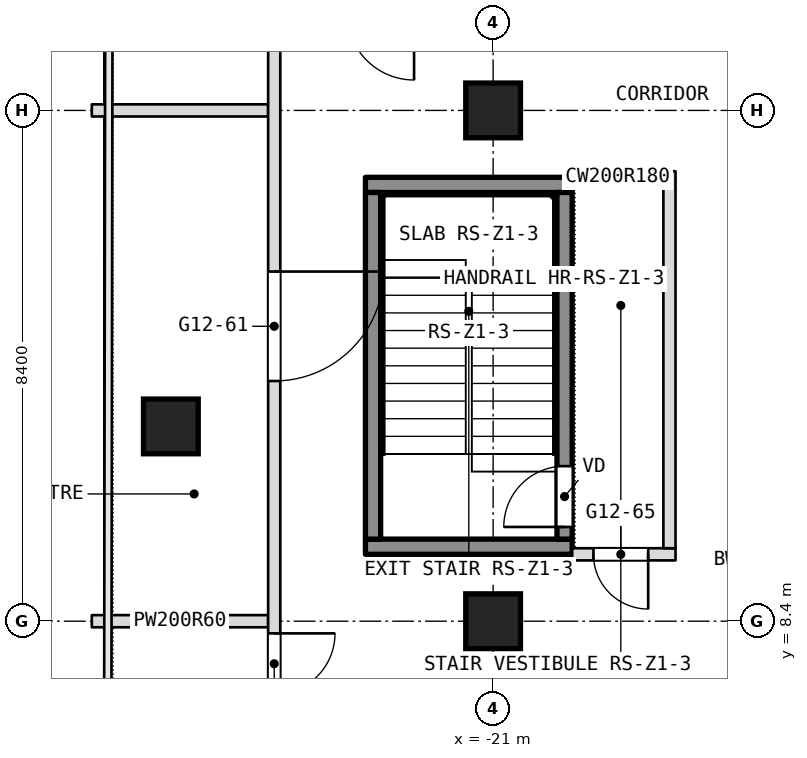
"""IFC4 building model, lengths in metres.
Left out: names, types, materials, properties, quantities, classifications, styles, units other than length and angle.
Written with IfcOpenShell. Run it as: python <this file> out.ifc"""

import sys

from ifc_helpers import new_model, si_unit, direction, frame, frame_2d, origin, origin_2d, place, context, subcontext, project, spatial, rectangle, extrude, element, fill, save


model = new_model("IFC4")
c1 = context("Model", 3, precision=1e-05, world=origin(), true_north=direction((0.0, 1.0)))
c2 = subcontext(c1, "Body", "Model", "MODEL_VIEW")
j1 = project(units=[si_unit("LENGTHUNIT", "METRE"), si_unit("PLANEANGLEUNIT", "RADIAN")], contexts=[c1])
p1 = place(None, origin())
s1 = spatial("IfcSite", under=j1, at=p1, CompositionType="ELEMENT")
p2 = place(p1, origin())
s2 = spatial("IfcBuilding", under=s1, at=p2, CompositionType="ELEMENT")
p3 = place(p2, frame((0.0, 0.0, 140.9)))
s3 = spatial("IfcBuildingStorey", under=s2, at=p3, CompositionType="ELEMENT", Elevation=140.9)
for number, where, z_axis, x_axis in (
    (1, (-21.0, 8.4, 0.0), (0.0, 0.0, 1.0), (1.0, 0.0, 0.0)),
    (2, (-21.0, 16.8, 0.0), (0.0, 0.0, 1.0), (1.0, 0.0, 0.0)),
    (3, (-26.3, 11.603, 0.0), (0.0, 0.0, 1.0), (1.0, 0.0, 0.0)),
):
    element("IfcColumn", number, at=place(p3, frame(where, z_axis=z_axis, x_axis=x_axis)), inside=s3, PredefinedType="COLUMN", context=c2, shape_type="SweptSolid", body=[
        extrude(rectangle(XDim=0.9, YDim=0.9, at=origin_2d()), origin(), (0.0, 0.0, 1.0), 3.6),
    ])
p4 = place(p3, frame((-27.6, 8.4, 0.0), z_axis=(0.0, 0.0, 1.0), x_axis=(1.0, 0.0, 0.0)))
e4 = element("IfcWall", 4, at=p4, inside=s3, PredefinedType="PARTITIONING", context=c2, shape_type="SweptSolid", body=[
    extrude(rectangle(XDim=2.9, YDim=0.2, at=frame_2d((1.45, 0.0))), origin(), (0.0, 0.0, 1.0), 2.89),
])
p5 = place(p3, frame((-19.7, 9.5, 0.0), z_axis=(0.0, 0.0, 1.0), x_axis=(1.0, 0.0, 0.0)))
e5 = element("IfcWall", 5, at=p5, inside=s3, PredefinedType="PARTITIONING", context=c2, shape_type="SweptSolid", body=[
    extrude(rectangle(XDim=1.7, YDim=0.2, at=frame_2d((0.85, 0.0))), origin(), (0.0, 0.0, 1.0), 3.34),
])
p6 = place(p5, frame((0.35, 0.0, 0.0)))
e6 = element("IfcOpeningElement", 6, at=p6, cuts=e5, PredefinedType="OPENING", context=c2, shape_type="SweptSolid", body=[
    extrude(rectangle(XDim=0.9, YDim=2.1, at=frame_2d((0.45, 1.05))), frame((0.0, 0.1, 0.0), z_axis=(0.0, -1.0, 0.0), x_axis=(1.0, 0.0, 0.0)), (0.0, 0.0, 1.0), 0.2),
])
p7 = place(p3, frame((-19.7, 15.7, 0.0), z_axis=(0.0, 0.0, 1.0), x_axis=(1.0, 0.0, 0.0)))
e7 = element("IfcWall", 7, at=p7, inside=s3, PredefinedType="PARTITIONING", context=c2, shape_type="SweptSolid", body=[
    extrude(rectangle(XDim=1.5, YDim=0.2, at=frame_2d((0.75, 0.0))), origin(), (0.0, 0.0, 1.0), 3.34),
])
p8 = place(p3, frame((-27.6, 16.8, 0.0), z_axis=(0.0, 0.0, 1.0), x_axis=(1.0, 0.0, 0.0)))
e8 = element("IfcWall", 8, at=p8, inside=s3, PredefinedType="PARTITIONING", context=c2, shape_type="SweptSolid", body=[
    extrude(rectangle(XDim=2.9, YDim=0.2, at=frame_2d((1.45, 0.0))), origin(), (0.0, 0.0, 1.0), 2.89),
])
p9 = place(p3, frame((-18.1, 9.6, 0.0), z_axis=(0.0, 0.0, 1.0), x_axis=(0.0, 1.0, 0.0)))
e9 = element("IfcWall", 9, at=p9, inside=s3, PredefinedType="PARTITIONING", context=c2, shape_type="SweptSolid", body=[
    extrude(rectangle(XDim=6.2, YDim=0.2, at=frame_2d((3.1, 0.0))), origin(), (0.0, 0.0, 1.0), 3.34),
])
p10 = place(p3, frame((-24.6, 6.9, 0.0), z_axis=(0.0, 0.0, 1.0), x_axis=(0.0, 1.0, 0.0)))
e10 = element("IfcWall", 10, at=p10, inside=s3, PredefinedType="PARTITIONING", context=c2, shape_type="SweptSolid", body=[
    extrude(rectangle(XDim=11.6, YDim=0.2, at=frame_2d((5.8, 0.0))), origin(), (0.0, 0.0, 1.0), 3.34),
])
p11 = place(p10, frame((5.45, 0.0, 0.0)))
e11 = element("IfcOpeningElement", 11, at=p11, cuts=e10, PredefinedType="OPENING", context=c2, shape_type="SweptSolid", body=[
    extrude(rectangle(XDim=1.8, YDim=2.1, at=frame_2d((0.9, 1.05))), frame((0.0, 0.1, 0.0), z_axis=(0.0, -1.0, 0.0), x_axis=(1.0, 0.0, 0.0)), (0.0, 0.0, 1.0), 0.2),
])
p12 = place(p10, frame((0.3, 0.0, 0.0)))
e12 = element("IfcOpeningElement", 12, at=p12, cuts=e10, PredefinedType="OPENING", context=c2, shape_type="SweptSolid", body=[
    extrude(rectangle(XDim=1.0, YDim=2.1, at=frame_2d((0.5, 1.05))), frame((0.0, 0.1, 0.0), z_axis=(0.0, -1.0, 0.0), x_axis=(1.0, 0.0, 0.0)), (0.0, 0.0, 1.0), 0.2),
])
for number, where, z_axis, x_axis in (
    (13, (-23.1, 9.625, 0.1), (0.0, 0.0, 1.0), (1.0, 0.0, 0.0)),
    (14, (-23.1, 15.575, 0.1), (0.0, 0.0, 1.0), (1.0, 0.0, 0.0)),
):
    element("IfcWall", number, at=place(p3, frame(where, z_axis=z_axis, x_axis=x_axis)), inside=s3, PredefinedType="SHEAR", context=c2, shape_type="SweptSolid", body=[
        extrude(rectangle(XDim=3.4, YDim=0.25, at=frame_2d((1.7, 0.0))), origin(), (0.0, 0.0, 1.0), 3.6),
    ])
p13 = place(p3, frame((-22.975, 9.75, 0.1), z_axis=(0.0, 0.0, 1.0), x_axis=(0.0, 1.0, 0.0)))
e15 = element("IfcWall", 15, at=p13, inside=s3, PredefinedType="SHEAR", context=c2, shape_type="SweptSolid", body=[
    extrude(rectangle(XDim=5.7, YDim=0.25, at=frame_2d((2.85, 0.0))), origin(), (0.0, 0.0, 1.0), 3.6),
])
p14 = place(p3, frame((-19.825, 9.75, 0.1), z_axis=(0.0, 0.0, 1.0), x_axis=(0.0, 1.0, 0.0)))
e16 = element("IfcWall", 16, at=p14, inside=s3, PredefinedType="SHEAR", context=c2, shape_type="SweptSolid", body=[
    extrude(rectangle(XDim=5.7, YDim=0.25, at=frame_2d((2.85, 0.0))), origin(), (0.0, 0.0, 1.0), 3.6),
])
p15 = place(p14, frame((0.2, 0.0, 0.0)))
e17 = element("IfcOpeningElement", 17, at=p15, cuts=e16, PredefinedType="OPENING", context=c2, shape_type="SweptSolid", body=[
    extrude(rectangle(XDim=1.0, YDim=2.1, at=frame_2d((0.5, 1.05))), frame((0.0, 0.125, 0.0), z_axis=(0.0, -1.0, 0.0), x_axis=(1.0, 0.0, 0.0)), (0.0, 0.0, 1.0), 0.25),
])
p16 = place(p6, origin())
e18 = element("IfcDoor", 18, at=p16, inside=s3, OperationType="SINGLE_SWING_RIGHT", PredefinedType="DOOR", context=c2, shape_type="SweptSolid", body=[
    extrude(rectangle(XDim=0.9, YDim=2.1, at=frame_2d((0.45, 1.05))), frame((0.0, 0.025, 0.0), z_axis=(0.0, -1.0, 0.0), x_axis=(1.0, 0.0, 0.0)), (0.0, 0.0, 1.0), 0.05),
])
fill(e6, e18)
p17 = place(p11, origin())
e19 = element("IfcDoor", 19, at=p17, inside=s3, OperationType="DOUBLE_DOOR_SINGLE_SWING", PredefinedType="DOOR", context=c2, shape_type="SweptSolid", body=[
    extrude(rectangle(XDim=1.8, YDim=2.1, at=frame_2d((0.9, 1.05))), frame((0.0, 0.025, 0.0), z_axis=(0.0, -1.0, 0.0), x_axis=(1.0, 0.0, 0.0)), (0.0, 0.0, 1.0), 0.05),
])
fill(e11, e19)
p18 = place(p12, origin())
e20 = element("IfcDoor", 20, at=p18, inside=s3, OperationType="SINGLE_SWING_LEFT", PredefinedType="DOOR", context=c2, shape_type="SweptSolid", body=[
    extrude(rectangle(XDim=1.0, YDim=2.1, at=frame_2d((0.5, 1.05))), frame((0.0, 0.025, 0.0), z_axis=(0.0, -1.0, 0.0), x_axis=(1.0, 0.0, 0.0)), (0.0, 0.0, 1.0), 0.05),
])
fill(e12, e20)
p19 = place(p15, origin())
e21 = element("IfcDoor", 21, at=p19, inside=s3, OperationType="SINGLE_SWING_LEFT", PredefinedType="DOOR", context=c2, shape_type="SweptSolid", body=[
    extrude(rectangle(XDim=1.0, YDim=2.1, at=frame_2d((0.5, 1.05))), frame((0.0, 0.025, 0.0), z_axis=(0.0, -1.0, 0.0), x_axis=(1.0, 0.0, 0.0)), (0.0, 0.0, 1.0), 0.05),
])
fill(e17, e21)
save(model, sys.argv[1])
